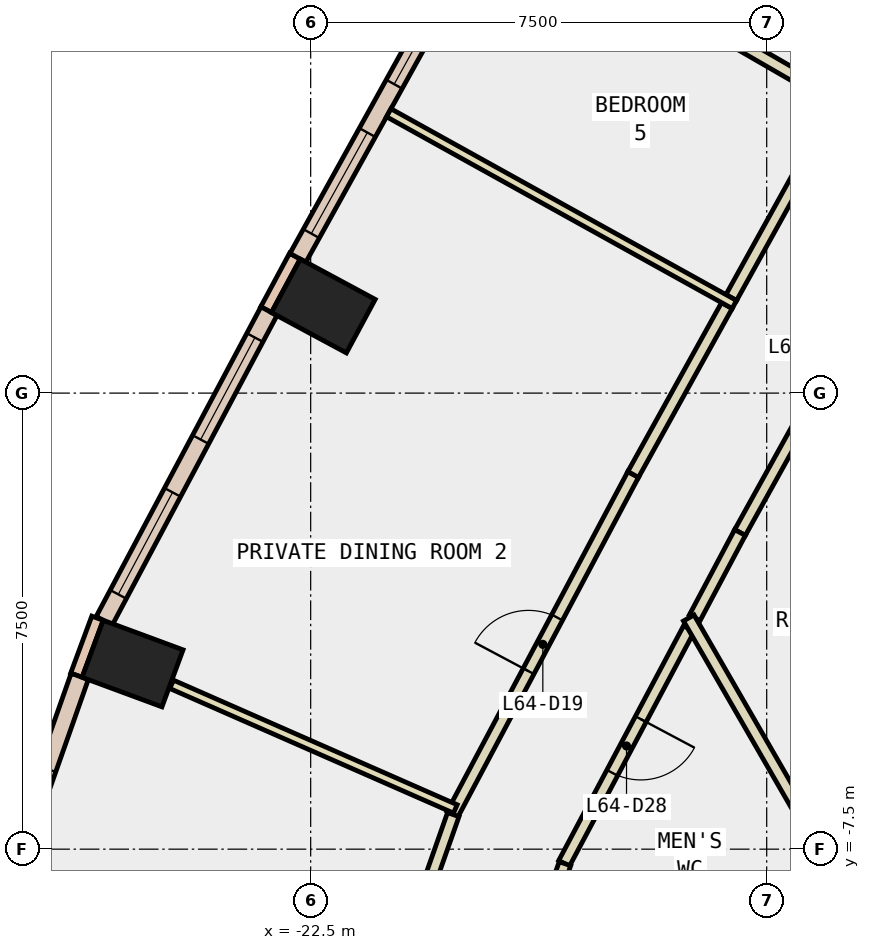
"""IFC4 building model, lengths in metres.
Left out: names, types, materials, properties, quantities, classifications, styles, units other than length and angle.
Written with IfcOpenShell. Run it as: python <this file> out.ifc"""

import sys

from ifc_helpers import new_model, si_unit, direction, frame, frame_2d, origin, origin_2d, place, context, subcontext, project, spatial, rectangle, extrude, element, fill, save


model = new_model("IFC4")
c1 = context("Model", 3, precision=1e-05, world=origin(), true_north=direction((0.0, 1.0)))
c2 = subcontext(c1, "Body", "Model", "MODEL_VIEW")
j1 = project(units=[si_unit("LENGTHUNIT", "METRE"), si_unit("PLANEANGLEUNIT", "RADIAN")], contexts=[c1])
p1 = place(None, origin())
s1 = spatial("IfcSite", under=j1, at=p1, CompositionType="ELEMENT")
p2 = place(p1, origin())
s2 = spatial("IfcBuilding", under=s1, at=p2, CompositionType="ELEMENT")
p3 = place(p2, frame((0.0, 0.0, 277.4)))
s3 = spatial("IfcBuildingStorey", under=s2, at=p3, CompositionType="ELEMENT", Elevation=277.4)
for number, where, z_axis, x_axis in (
    (1, (-22.292, 1.433, -0.34), (0.0, 0.0, 1.0), (0.474, 0.881, 0.0)),
    (2, (-25.429, -4.448, -0.34), (0.0, 0.0, 1.0), (0.347, 0.938, 0.0)),
):
    element("IfcColumn", number, at=place(p3, frame(where, z_axis=z_axis, x_axis=x_axis)), inside=s3, PredefinedType="COLUMN", context=c2, shape_type="SweptSolid", body=[
        extrude(rectangle(XDim=1.0, YDim=1.4, at=origin_2d()), origin(), (0.0, 0.0, 1.0), 3.34),
    ])
p4 = place(p3, frame((-7.578, -4.375, -0.34), z_axis=(0.0, 0.0, 1.0), x_axis=(-0.866024315419, -0.5000018851, 0.0)))
e3 = element("IfcWall", 3, at=p4, inside=s3, PredefinedType="SHEAR", context=c2, shape_type="SweptSolid", body=[
    extrude(rectangle(XDim=9.0, YDim=0.8, at=frame_2d((4.5, 0.0))), origin(), (0.0, 0.0, 1.0), 3.34),
])
p5 = place(p3, frame((-22.759, 2.253, 0.0), z_axis=(0.0, 0.0, 1.0), x_axis=(-0.473765014438, -0.880651299377, 0.0)))
e4 = element("IfcWall", 4, at=p5, inside=s3, PredefinedType="STANDARD", context=c2, shape_type="SweptSolid", body=[
    extrude(rectangle(XDim=1.0, YDim=0.2, at=frame_2d((0.5, 0.0))), origin(), (0.0, 0.0, 1.0), 3.0),
])
p6 = place(p3, frame((-26.006, -3.702, 0.0), z_axis=(0.0, 0.0, 1.0), x_axis=(-0.346892928577, -0.937904737222, 0.0)))
e5 = element("IfcWall", 5, at=p6, inside=s3, PredefinedType="STANDARD", context=c2, shape_type="SweptSolid", body=[
    extrude(rectangle(XDim=1.0, YDim=0.2, at=frame_2d((0.5, 0.0))), origin(), (0.0, 0.0, 1.0), 3.0),
])
p7 = place(p3, frame((-19.984, 7.14, 0.0), z_axis=(0.0, 0.0, 1.0), x_axis=(-0.485049005017, -0.874486971162, 0.0)))
e6 = element("IfcWall", 6, at=p7, inside=s3, PredefinedType="STANDARD", context=c2, shape_type="SweptSolid", body=[
    extrude(rectangle(XDim=5.62, YDim=0.3, at=frame_2d((2.81, 0.0))), origin(), (0.0, 0.0, 1.0), 3.0),
])
p8 = place(p7, frame((0.455, 0.0, 0.9)))
e7 = element("IfcOpeningElement", 7, at=p8, cuts=e6, PredefinedType="OPENING", context=c2, shape_type="SweptSolid", body=[
    extrude(rectangle(XDim=1.9, YDim=2.0, at=frame_2d((0.95, 1.0))), frame((0.0, 0.16, 0.0), z_axis=(0.0, -1.0, 0.0), x_axis=(1.0, 0.0, 0.0)), (0.0, 0.0, 1.0), 0.32),
])
p9 = place(p7, frame((3.265, 0.0, 0.9)))
e8 = element("IfcOpeningElement", 8, at=p9, cuts=e6, PredefinedType="OPENING", context=c2, shape_type="SweptSolid", body=[
    extrude(rectangle(XDim=1.9, YDim=2.0, at=frame_2d((0.95, 1.0))), frame((0.0, 0.16, 0.0), z_axis=(0.0, -1.0, 0.0), x_axis=(1.0, 0.0, 0.0)), (0.0, 0.0, 1.0), 0.32),
])
p10 = place(p3, frame((-23.186, 1.348, 0.0), z_axis=(0.0, 0.0, 1.0), x_axis=(-0.469691596427, -0.882830563724, 0.0)))
e9 = element("IfcWall", 9, at=p10, inside=s3, PredefinedType="STANDARD", context=c2, shape_type="SweptSolid", body=[
    extrude(rectangle(XDim=5.768, YDim=0.3, at=frame_2d((2.884, 0.0))), origin(), (0.0, 0.0, 1.0), 3.0),
])
p11 = place(p10, frame((0.492, 0.0, 0.9)))
e10 = element("IfcOpeningElement", 10, at=p11, cuts=e9, PredefinedType="OPENING", context=c2, shape_type="SweptSolid", body=[
    extrude(rectangle(XDim=1.9, YDim=2.0, at=frame_2d((0.95, 1.0))), frame((0.0, 0.16, 0.0), z_axis=(0.0, -1.0, 0.0), x_axis=(1.0, 0.0, 0.0)), (0.0, 0.0, 1.0), 0.32),
])
p12 = place(p10, frame((3.376, 0.0, 0.9)))
e11 = element("IfcOpeningElement", 11, at=p12, cuts=e9, PredefinedType="OPENING", context=c2, shape_type="SweptSolid", body=[
    extrude(rectangle(XDim=1.9, YDim=2.0, at=frame_2d((0.95, 1.0))), frame((0.0, 0.16, 0.0), z_axis=(0.0, -1.0, 0.0), x_axis=(1.0, 0.0, 0.0)), (0.0, 0.0, 1.0), 0.32),
])
p13 = place(p3, frame((-26.298, -4.659, 0.0), z_axis=(0.0, 0.0, 1.0), x_axis=(-0.332491532378, -0.943106240514, 0.0)))
e12 = element("IfcWall", 12, at=p13, inside=s3, PredefinedType="STANDARD", context=c2, shape_type="SweptSolid", body=[
    extrude(rectangle(XDim=4.625, YDim=0.3, at=frame_2d((2.312, 0.0))), origin(), (0.0, 0.0, 1.0), 3.0),
])
p14 = place(p13, frame((1.613, 0.0, 0.9)))
e13 = element("IfcOpeningElement", 13, at=p14, cuts=e12, PredefinedType="OPENING", context=c2, shape_type="SweptSolid", body=[
    extrude(rectangle(XDim=1.4, YDim=2.0, at=frame_2d((0.7, 1.0))), frame((0.0, 0.16, 0.0), z_axis=(0.0, -1.0, 0.0), x_axis=(1.0, 0.0, 0.0)), (0.0, 0.0, 1.0), 0.32),
])
p15 = place(p3, frame((-13.174, 1.79, 0.0), z_axis=(0.0, 0.0, 1.0), x_axis=(-0.485079003918, -0.874470331091, 0.0)))
e14 = element("IfcWall", 14, at=p15, inside=s3, PredefinedType="PARTITIONING", context=c2, shape_type="SweptSolid", body=[
    extrude(rectangle(XDim=4.669, YDim=0.2, at=frame_2d((2.334, 0.0))), origin(), (0.0, 0.0, 1.0), 3.0),
])
p16 = place(p15, frame((1.834, 0.0, 0.0)))
e15 = element("IfcOpeningElement", 15, at=p16, cuts=e14, PredefinedType="OPENING", context=c2, shape_type="SweptSolid", body=[
    extrude(rectangle(XDim=1.0, YDim=2.1, at=frame_2d((0.5, 1.05))), frame((0.0, 0.11, 0.0), z_axis=(0.0, -1.0, 0.0), x_axis=(1.0, 0.0, 0.0)), (0.0, 0.0, 1.0), 0.22),
])
p17 = place(p3, frame((-15.439, -2.293, 0.0), z_axis=(0.0, 0.0, 1.0), x_axis=(-0.469248780065, -0.883066012486, 0.0)))
e16 = element("IfcWall", 16, at=p17, inside=s3, PredefinedType="PARTITIONING", context=c2, shape_type="SweptSolid", body=[
    extrude(rectangle(XDim=1.59, YDim=0.2, at=frame_2d((0.795, 0.0))), origin(), (0.0, 0.0, 1.0), 3.0),
])
p18 = place(p3, frame((-16.279, -3.873, 0.0), z_axis=(0.0, 0.0, 1.0), x_axis=(-0.469587967357, -0.882885689608, 0.0)))
e17 = element("IfcWall", 17, at=p18, inside=s3, PredefinedType="PARTITIONING", context=c2, shape_type="SweptSolid", body=[
    extrude(rectangle(XDim=4.372, YDim=0.2, at=frame_2d((2.186, 0.0))), origin(), (0.0, 0.0, 1.0), 3.0),
])
p19 = place(p18, frame((1.686, 0.0, 0.0)))
e18 = element("IfcOpeningElement", 18, at=p19, cuts=e17, PredefinedType="OPENING", context=c2, shape_type="SweptSolid", body=[
    extrude(rectangle(XDim=1.0, YDim=2.1, at=frame_2d((0.5, 1.05))), frame((0.0, 0.11, 0.0), z_axis=(0.0, -1.0, 0.0), x_axis=(1.0, 0.0, 0.0)), (0.0, 0.0, 1.0), 0.22),
])
p20 = place(p3, frame((-18.318, -7.739, 0.0), z_axis=(0.0, 0.0, 1.0), x_axis=(-0.332486504777, -0.943108012977, 0.0)))
e19 = element("IfcWall", 19, at=p20, inside=s3, PredefinedType="PARTITIONING", context=c2, shape_type="SweptSolid", body=[
    extrude(rectangle(XDim=2.565, YDim=0.2, at=frame_2d((1.282, 0.0))), origin(), (0.0, 0.0, 1.0), 3.0),
])
p21 = place(p3, frame((-15.583, 1.571, 0.0), z_axis=(0.0, 0.0, 1.0), x_axis=(0.484944791944, 0.874544766588, 0.0)))
e20 = element("IfcWall", 20, at=p21, inside=s3, PredefinedType="PARTITIONING", context=c2, shape_type="SweptSolid", body=[
    extrude(rectangle(XDim=3.178, YDim=0.2, at=frame_2d((1.589, 0.0))), origin(), (0.0, 0.0, 1.0), 3.0),
])
p22 = place(p3, frame((-20.168, -6.926, 0.0), z_axis=(0.0, 0.0, 1.0), x_axis=(0.469552838911, 0.882904372778, 0.0)))
e21 = element("IfcWall", 21, at=p22, inside=s3, PredefinedType="PARTITIONING", context=c2, shape_type="SweptSolid", body=[
    extrude(rectangle(XDim=6.329, YDim=0.2, at=frame_2d((3.165, 0.0))), origin(), (0.0, 0.0, 1.0), 3.0),
])
p23 = place(p22, frame((2.665, 0.0, 0.0)))
e22 = element("IfcOpeningElement", 22, at=p23, cuts=e21, PredefinedType="OPENING", context=c2, shape_type="SweptSolid", body=[
    extrude(rectangle(XDim=1.0, YDim=2.1, at=frame_2d((0.5, 1.05))), frame((0.0, 0.11, 0.0), z_axis=(0.0, -1.0, 0.0), x_axis=(1.0, 0.0, 0.0)), (0.0, 0.0, 1.0), 0.22),
])
p24 = place(p3, frame((-17.196, -1.338, 0.0), z_axis=(0.0, 0.0, 1.0), x_axis=(0.485107756493, 0.87445438108, 0.0)))
e23 = element("IfcWall", 23, at=p24, inside=s3, PredefinedType="PARTITIONING", context=c2, shape_type="SweptSolid", body=[
    extrude(rectangle(XDim=3.177, YDim=0.2, at=frame_2d((1.588, 0.0))), origin(), (0.0, 0.0, 1.0), 3.0),
])
p25 = place(p3, frame((-21.248, -10.035, 0.0), z_axis=(0.0, 0.0, 1.0), x_axis=(0.332233916116, 0.943197023417, 0.0)))
e24 = element("IfcWall", 24, at=p25, inside=s3, PredefinedType="PARTITIONING", context=c2, shape_type="SweptSolid", body=[
    extrude(rectangle(XDim=3.29, YDim=0.2, at=frame_2d((1.645, 0.0))), origin(), (0.0, 0.0, 1.0), 3.0),
])
p26 = place(p3, frame((-14.079, -7.514, 0.0), z_axis=(0.0, 0.0, 1.0), x_axis=(-0.499959077901, 0.86604902888, 0.0)))
e25 = element("IfcWall", 25, at=p26, inside=s3, PredefinedType="PARTITIONING", context=c2, shape_type="SweptSolid", body=[
    extrude(rectangle(XDim=4.406, YDim=0.2, at=frame_2d((2.203, 0.0))), origin(), (0.0, 0.0, 1.0), 3.0),
])
p27 = place(p3, frame((-15.953, 6.039, 0.0), z_axis=(0.0, 0.0, 1.0), x_axis=(0.865998541277, -0.500046524342, 0.0)))
e26 = element("IfcWall", 26, at=p27, inside=s3, PredefinedType="PARTITIONING", context=c2, shape_type="SweptSolid", body=[
    extrude(rectangle(XDim=2.5, YDim=0.2, at=frame_2d((1.25, 0.0))), origin(), (0.0, 0.0, 1.0), 3.0),
])
p28 = place(p3, frame((-15.532, 1.457, 0.0), z_axis=(0.0, 0.0, 1.0), x_axis=(-0.874467143452, 0.485084750351, 0.0)))
e27 = element("IfcWall", 27, at=p28, inside=s3, PredefinedType="PARTITIONING", context=c2, shape_type="SweptSolid", body=[
    extrude(rectangle(XDim=6.5, YDim=0.15, at=frame_2d((3.25, 0.0))), origin(), (0.0, 0.0, 1.0), 3.0),
])
p29 = place(p3, frame((-20.121, -6.838, 0.0), z_axis=(0.0, 0.0, 1.0), x_axis=(-0.91561994307, 0.402044922679, 0.0)))
e28 = element("IfcWall", 28, at=p29, inside=s3, PredefinedType="PARTITIONING", context=c2, shape_type="SweptSolid", body=[
    extrude(rectangle(XDim=5.096, YDim=0.15, at=frame_2d((2.548, 0.0))), origin(), (0.0, 0.0, 1.0), 3.0),
])
p30 = place(p8, origin())
e29 = element("IfcWindow", 29, at=p30, inside=s3, PartitioningType="SINGLE_PANEL", PredefinedType="WINDOW", context=c2, shape_type="SweptSolid", body=[
    extrude(rectangle(XDim=1.9, YDim=2.0, at=frame_2d((0.95, 1.0))), frame((0.0, 0.03, 0.0), z_axis=(0.0, -1.0, 0.0), x_axis=(1.0, 0.0, 0.0)), (0.0, 0.0, 1.0), 0.06),
])
fill(e7, e29)
p31 = place(p9, origin())
e30 = element("IfcWindow", 30, at=p31, inside=s3, PartitioningType="SINGLE_PANEL", PredefinedType="WINDOW", context=c2, shape_type="SweptSolid", body=[
    extrude(rectangle(XDim=1.9, YDim=2.0, at=frame_2d((0.95, 1.0))), frame((0.0, 0.03, 0.0), z_axis=(0.0, -1.0, 0.0), x_axis=(1.0, 0.0, 0.0)), (0.0, 0.0, 1.0), 0.06),
])
fill(e8, e30)
p32 = place(p11, origin())
e31 = element("IfcWindow", 31, at=p32, inside=s3, PartitioningType="SINGLE_PANEL", PredefinedType="WINDOW", context=c2, shape_type="SweptSolid", body=[
    extrude(rectangle(XDim=1.9, YDim=2.0, at=frame_2d((0.95, 1.0))), frame((0.0, 0.03, 0.0), z_axis=(0.0, -1.0, 0.0), x_axis=(1.0, 0.0, 0.0)), (0.0, 0.0, 1.0), 0.06),
])
fill(e10, e31)
p33 = place(p12, origin())
e32 = element("IfcWindow", 32, at=p33, inside=s3, PartitioningType="SINGLE_PANEL", PredefinedType="WINDOW", context=c2, shape_type="SweptSolid", body=[
    extrude(rectangle(XDim=1.9, YDim=2.0, at=frame_2d((0.95, 1.0))), frame((0.0, 0.03, 0.0), z_axis=(0.0, -1.0, 0.0), x_axis=(1.0, 0.0, 0.0)), (0.0, 0.0, 1.0), 0.06),
])
fill(e11, e32)
p34 = place(p23, origin())
e33 = element("IfcDoor", 33, at=p34, inside=s3, OperationType="SINGLE_SWING_LEFT", PredefinedType="DOOR", context=c2, shape_type="SweptSolid", body=[
    extrude(rectangle(XDim=1.0, YDim=2.1, at=frame_2d((0.5, 1.05))), frame((0.0, 0.025, 0.0), z_axis=(0.0, -1.0, 0.0), x_axis=(1.0, 0.0, 0.0)), (0.0, 0.0, 1.0), 0.05),
])
fill(e22, e33)
p35 = place(p19, origin())
e34 = element("IfcDoor", 34, at=p35, inside=s3, OperationType="SINGLE_SWING_LEFT", PredefinedType="DOOR", context=c2, shape_type="SweptSolid", body=[
    extrude(rectangle(XDim=1.0, YDim=2.1, at=frame_2d((0.5, 1.05))), frame((0.0, 0.025, 0.0), z_axis=(0.0, -1.0, 0.0), x_axis=(1.0, 0.0, 0.0)), (0.0, 0.0, 1.0), 0.05),
])
fill(e18, e34)
save(model, sys.argv[1])
